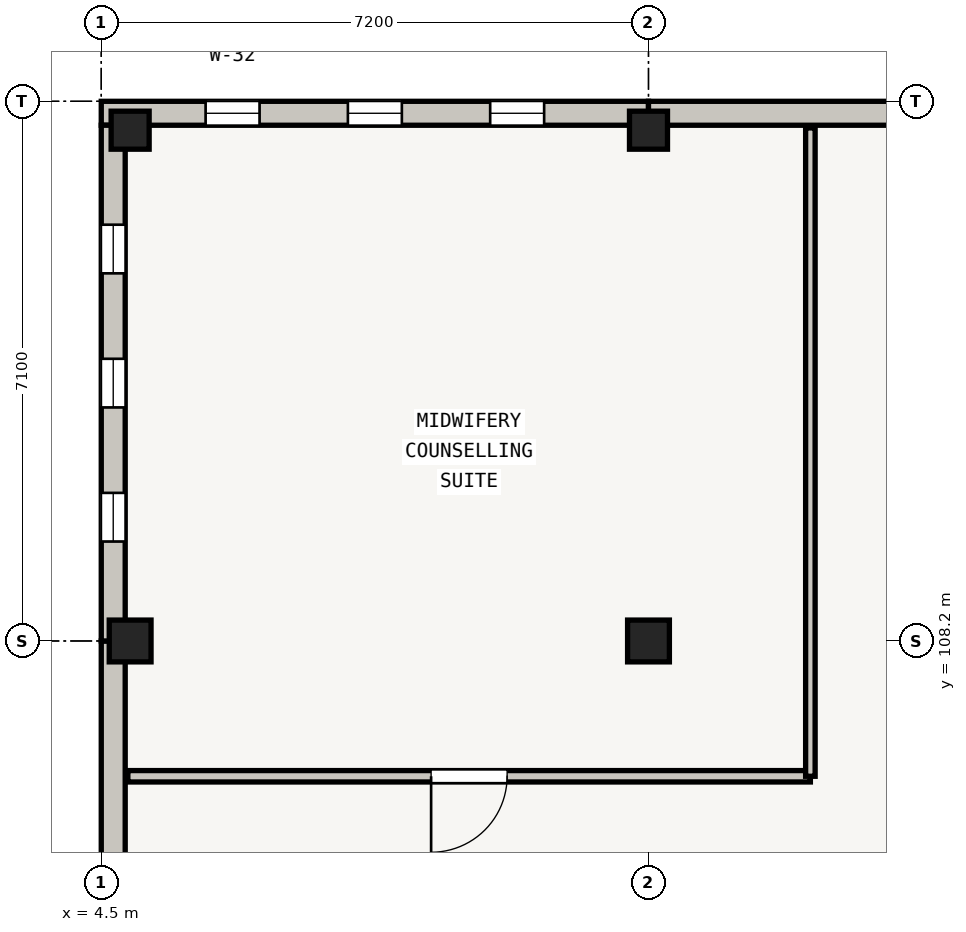
"""IFC4 building model, lengths in metres.
Left out: names, types, materials, properties, quantities, classifications, styles, units other than length and angle.
Written with IfcOpenShell. Run it as: python <this file> out.ifc"""

import sys

from ifc_helpers import new_model, si_unit, direction, frame, frame_2d, origin, origin_2d, place, context, subcontext, project, spatial, rectangle, extrude, element, fill, save


model = new_model("IFC4")
c1 = context("Model", 3, precision=1e-05, world=origin(), true_north=direction((0.0, 1.0)))
c2 = subcontext(c1, "Body", "Model", "MODEL_VIEW")
j1 = project(units=[si_unit("LENGTHUNIT", "METRE"), si_unit("PLANEANGLEUNIT", "RADIAN")], contexts=[c1])
p1 = place(None, origin())
s1 = spatial("IfcSite", under=j1, at=p1, CompositionType="ELEMENT")
p2 = place(p1, origin())
s2 = spatial("IfcBuilding", under=s1, at=p2, CompositionType="ELEMENT")
p3 = place(p2, frame((0.0, 0.0, 8.7)))
s3 = spatial("IfcBuildingStorey", under=s2, at=p3, CompositionType="ELEMENT", Elevation=8.7)
p4 = place(p3, frame((4.88, 108.2, 0.0), z_axis=(0.0, 0.0, 1.0), x_axis=(1.0, 0.0, 0.0)))
e1 = element("IfcColumn", 1, at=p4, inside=s3, PredefinedType="COLUMN", context=c2, shape_type="SweptSolid", body=[
    extrude(rectangle(XDim=0.55, YDim=0.55, at=origin_2d()), origin(), (0.0, 0.0, 1.0), 3.935),
])
p5 = place(p3, frame((4.88, 114.92, 0.0), z_axis=(0.0, 0.0, 1.0), x_axis=(1.0, 0.0, 0.0)))
e2 = element("IfcColumn", 2, at=p5, inside=s3, PredefinedType="COLUMN", context=c2, shape_type="SweptSolid", body=[
    extrude(rectangle(XDim=0.5, YDim=0.5, at=origin_2d()), origin(), (0.0, 0.0, 1.0), 3.935),
])
p6 = place(p3, frame((11.7, 108.2, 0.0), z_axis=(0.0, 0.0, 1.0), x_axis=(1.0, 0.0, 0.0)))
e3 = element("IfcColumn", 3, at=p6, inside=s3, PredefinedType="COLUMN", context=c2, shape_type="SweptSolid", body=[
    extrude(rectangle(XDim=0.55, YDim=0.55, at=origin_2d()), origin(), (0.0, 0.0, 1.0), 3.935),
])
p7 = place(p3, frame((11.7, 114.92, 0.0), z_axis=(0.0, 0.0, 1.0), x_axis=(1.0, 0.0, 0.0)))
e4 = element("IfcColumn", 4, at=p7, inside=s3, PredefinedType="COLUMN", context=c2, shape_type="SweptSolid", body=[
    extrude(rectangle(XDim=0.5, YDim=0.5, at=origin_2d()), origin(), (0.0, 0.0, 1.0), 3.935),
])
p8 = place(p3, frame((4.5, 115.143, 0.0), z_axis=(0.0, 0.0, 1.0), x_axis=(1.0, 0.0, 0.0)))
e5 = element("IfcWall", 5, at=p8, inside=s3, PredefinedType="SOLIDWALL", context=c2, shape_type="SweptSolid", body=[
    extrude(rectangle(XDim=7.2, YDim=0.315, at=frame_2d((3.6, 0.0))), origin(), (0.0, 0.0, 1.0), 3.32),
])
p9 = place(p8, frame((1.373, 0.0, 0.55)))
e6 = element("IfcOpeningElement", 6, at=p9, cuts=e5, PredefinedType="OPENING", context=c2, shape_type="SweptSolid", body=[
    extrude(rectangle(XDim=0.71, YDim=2.14, at=frame_2d((0.355, 1.07))), frame((0.0, 0.157, 0.0), z_axis=(0.0, -1.0, 0.0), x_axis=(1.0, 0.0, 0.0)), (0.0, 0.0, 1.0), 0.315),
])
p10 = place(p8, frame((3.245, 0.0, 0.55)))
e7 = element("IfcOpeningElement", 7, at=p10, cuts=e5, PredefinedType="OPENING", context=c2, shape_type="SweptSolid", body=[
    extrude(rectangle(XDim=0.71, YDim=2.14, at=frame_2d((0.355, 1.07))), frame((0.0, 0.157, 0.0), z_axis=(0.0, -1.0, 0.0), x_axis=(1.0, 0.0, 0.0)), (0.0, 0.0, 1.0), 0.315),
])
p11 = place(p8, frame((5.117, 0.0, 0.55)))
e8 = element("IfcOpeningElement", 8, at=p11, cuts=e5, PredefinedType="OPENING", context=c2, shape_type="SweptSolid", body=[
    extrude(rectangle(XDim=0.71, YDim=2.14, at=frame_2d((0.355, 1.07))), frame((0.0, 0.157, 0.0), z_axis=(0.0, -1.0, 0.0), x_axis=(1.0, 0.0, 0.0)), (0.0, 0.0, 1.0), 0.315),
])
p12 = place(p3, frame((11.7, 115.143, 0.0), z_axis=(0.0, 0.0, 1.0), x_axis=(1.0, 0.0, 0.0)))
e9 = element("IfcWall", 9, at=p12, inside=s3, PredefinedType="SOLIDWALL", context=c2, shape_type="SweptSolid", body=[
    extrude(rectangle(XDim=7.2, YDim=0.315, at=frame_2d((3.6, 0.0))), origin(), (0.0, 0.0, 1.0), 2.97),
])
p13 = place(p12, frame((3.215, 0.0, 0.55)))
e10 = element("IfcOpeningElement", 10, at=p13, cuts=e9, PredefinedType="OPENING", context=c2, shape_type="SweptSolid", body=[
    extrude(rectangle(XDim=0.77, YDim=2.06, at=frame_2d((0.385, 1.03))), frame((0.0, 0.157, 0.0), z_axis=(0.0, -1.0, 0.0), x_axis=(1.0, 0.0, 0.0)), (0.0, 0.0, 1.0), 0.315),
])
p14 = place(p3, frame((4.657, 101.48, 0.0), z_axis=(0.0, 0.0, 1.0), x_axis=(0.0, 1.0, 0.0)))
e11 = element("IfcWall", 11, at=p14, inside=s3, PredefinedType="SOLIDWALL", context=c2, shape_type="SweptSolid", body=[
    extrude(rectangle(XDim=6.72, YDim=0.315, at=frame_2d((3.36, 0.0))), origin(), (0.0, 0.0, 1.0), 2.97),
])
p15 = place(p14, frame((2.97, 0.0, 0.6)))
e12 = element("IfcOpeningElement", 12, at=p15, cuts=e11, PredefinedType="OPENING", context=c2, shape_type="SweptSolid", body=[
    extrude(rectangle(XDim=0.78, YDim=1.95, at=frame_2d((0.39, 0.975))), frame((0.0, 0.157, 0.0), z_axis=(0.0, -1.0, 0.0), x_axis=(1.0, 0.0, 0.0)), (0.0, 0.0, 1.0), 0.315),
])
p16 = place(p3, frame((4.657, 108.2, 0.0), z_axis=(0.0, 0.0, 1.0), x_axis=(0.0, 1.0, 0.0)))
e13 = element("IfcWall", 13, at=p16, inside=s3, PredefinedType="SOLIDWALL", context=c2, shape_type="SweptSolid", body=[
    extrude(rectangle(XDim=6.785, YDim=0.315, at=frame_2d((3.393, 0.0))), origin(), (0.0, 0.0, 1.0), 2.97),
])
p17 = place(p16, frame((1.308, 0.0, 0.6)))
e14 = element("IfcOpeningElement", 14, at=p17, cuts=e13, PredefinedType="OPENING", context=c2, shape_type="SweptSolid", body=[
    extrude(rectangle(XDim=0.64, YDim=1.85, at=frame_2d((0.32, 0.925))), frame((0.0, 0.157, 0.0), z_axis=(0.0, -1.0, 0.0), x_axis=(1.0, 0.0, 0.0)), (0.0, 0.0, 1.0), 0.315),
])
p18 = place(p16, frame((3.073, 0.0, 0.6)))
e15 = element("IfcOpeningElement", 15, at=p18, cuts=e13, PredefinedType="OPENING", context=c2, shape_type="SweptSolid", body=[
    extrude(rectangle(XDim=0.64, YDim=1.85, at=frame_2d((0.32, 0.925))), frame((0.0, 0.157, 0.0), z_axis=(0.0, -1.0, 0.0), x_axis=(1.0, 0.0, 0.0)), (0.0, 0.0, 1.0), 0.315),
])
p19 = place(p16, frame((4.837, 0.0, 0.6)))
e16 = element("IfcOpeningElement", 16, at=p19, cuts=e13, PredefinedType="OPENING", context=c2, shape_type="SweptSolid", body=[
    extrude(rectangle(XDim=0.64, YDim=1.85, at=frame_2d((0.32, 0.925))), frame((0.0, 0.157, 0.0), z_axis=(0.0, -1.0, 0.0), x_axis=(1.0, 0.0, 0.0)), (0.0, 0.0, 1.0), 0.315),
])
p20 = place(p3, frame((13.83, 106.42, 0.0), z_axis=(0.0, 0.0, 1.0), x_axis=(-1.0, 0.0, 0.0)))
e17 = element("IfcWall", 17, at=p20, inside=s3, PredefinedType="PARTITIONING", context=c2, shape_type="SweptSolid", body=[
    extrude(rectangle(XDim=8.98, YDim=0.15, at=frame_2d((4.49, 0.0))), origin(), (0.0, 0.0, 1.0), 2.955),
])
p21 = place(p20, frame((3.99, 0.0, 0.0)))
e18 = element("IfcOpeningElement", 18, at=p21, cuts=e17, PredefinedType="OPENING", context=c2, shape_type="SweptSolid", body=[
    extrude(rectangle(XDim=1.0, YDim=2.05, at=frame_2d((0.5, 1.025))), frame((0.0, 0.075, 0.0), z_axis=(0.0, -1.0, 0.0), x_axis=(1.0, 0.0, 0.0)), (0.0, 0.0, 1.0), 0.15),
])
p22 = place(p3, frame((13.83, 114.95, 0.0), z_axis=(0.0, 0.0, 1.0), x_axis=(0.0, -1.0, 0.0)))
e19 = element("IfcWall", 19, at=p22, inside=s3, PredefinedType="PARTITIONING", context=c2, shape_type="SweptSolid", body=[
    extrude(rectangle(XDim=8.53, YDim=0.125, at=frame_2d((4.265, 0.0))), origin(), (0.0, 0.0, 1.0), 2.955),
])
p23 = place(p9, origin())
e20 = element("IfcWindow", 20, at=p23, inside=s3, PartitioningType="SINGLE_PANEL", PredefinedType="WINDOW", context=c2, shape_type="SweptSolid", body=[
    extrude(rectangle(XDim=0.71, YDim=2.14, at=frame_2d((0.355, 1.07))), frame((0.0, 0.03, 0.0), z_axis=(0.0, -1.0, 0.0), x_axis=(1.0, 0.0, 0.0)), (0.0, 0.0, 1.0), 0.06),
])
fill(e6, e20)
p24 = place(p10, origin())
e21 = element("IfcWindow", 21, at=p24, inside=s3, PartitioningType="SINGLE_PANEL", PredefinedType="WINDOW", context=c2, shape_type="SweptSolid", body=[
    extrude(rectangle(XDim=0.71, YDim=2.14, at=frame_2d((0.355, 1.07))), frame((0.0, 0.03, 0.0), z_axis=(0.0, -1.0, 0.0), x_axis=(1.0, 0.0, 0.0)), (0.0, 0.0, 1.0), 0.06),
])
fill(e7, e21)
p25 = place(p11, origin())
e22 = element("IfcWindow", 22, at=p25, inside=s3, PartitioningType="SINGLE_PANEL", PredefinedType="WINDOW", context=c2, shape_type="SweptSolid", body=[
    extrude(rectangle(XDim=0.71, YDim=2.14, at=frame_2d((0.355, 1.07))), frame((0.0, 0.03, 0.0), z_axis=(0.0, -1.0, 0.0), x_axis=(1.0, 0.0, 0.0)), (0.0, 0.0, 1.0), 0.06),
])
fill(e8, e22)
p26 = place(p17, origin())
e23 = element("IfcWindow", 23, at=p26, inside=s3, PartitioningType="SINGLE_PANEL", PredefinedType="WINDOW", context=c2, shape_type="SweptSolid", body=[
    extrude(rectangle(XDim=0.64, YDim=1.85, at=frame_2d((0.32, 0.925))), frame((0.0, 0.03, 0.0), z_axis=(0.0, -1.0, 0.0), x_axis=(1.0, 0.0, 0.0)), (0.0, 0.0, 1.0), 0.06),
])
fill(e14, e23)
p27 = place(p18, origin())
e24 = element("IfcWindow", 24, at=p27, inside=s3, PartitioningType="SINGLE_PANEL", PredefinedType="WINDOW", context=c2, shape_type="SweptSolid", body=[
    extrude(rectangle(XDim=0.64, YDim=1.85, at=frame_2d((0.32, 0.925))), frame((0.0, 0.03, 0.0), z_axis=(0.0, -1.0, 0.0), x_axis=(1.0, 0.0, 0.0)), (0.0, 0.0, 1.0), 0.06),
])
fill(e15, e24)
p28 = place(p19, origin())
e25 = element("IfcWindow", 25, at=p28, inside=s3, PartitioningType="SINGLE_PANEL", PredefinedType="WINDOW", context=c2, shape_type="SweptSolid", body=[
    extrude(rectangle(XDim=0.64, YDim=1.85, at=frame_2d((0.32, 0.925))), frame((0.0, 0.03, 0.0), z_axis=(0.0, -1.0, 0.0), x_axis=(1.0, 0.0, 0.0)), (0.0, 0.0, 1.0), 0.06),
])
fill(e16, e25)
p29 = place(p21, origin())
e26 = element("IfcDoor", 26, at=p29, inside=s3, OperationType="SINGLE_SWING_RIGHT", PredefinedType="DOOR", context=c2, shape_type="SweptSolid", body=[
    extrude(rectangle(XDim=1.0, YDim=2.05, at=frame_2d((0.5, 1.025))), frame((0.0, 0.025, 0.0), z_axis=(0.0, -1.0, 0.0), x_axis=(1.0, 0.0, 0.0)), (0.0, 0.0, 1.0), 0.05),
])
fill(e18, e26)
save(model, sys.argv[1])
